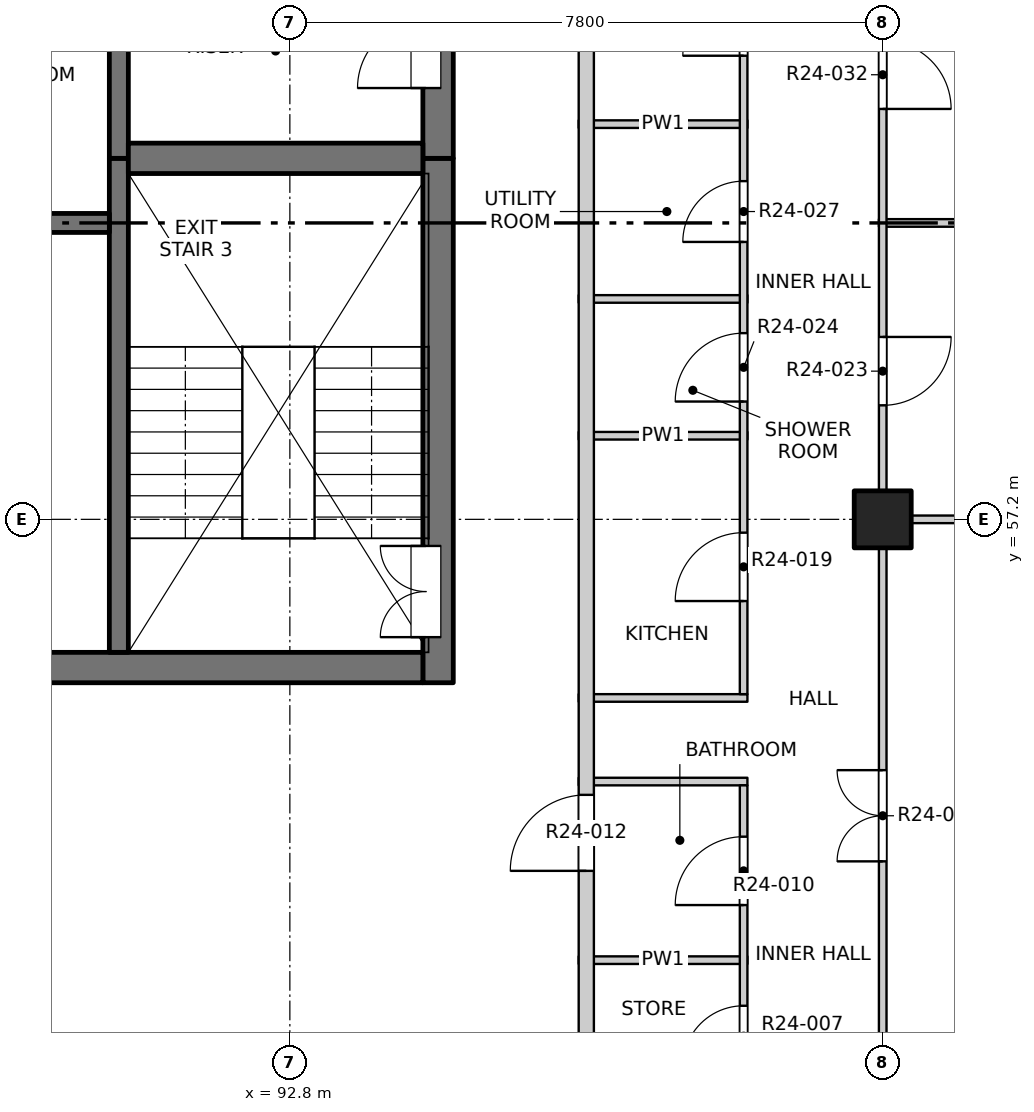
"""IFC4 building model, lengths in metres.
Left out: names, types, materials, properties, quantities, classifications, styles, units other than length and angle.
Written with IfcOpenShell. Run it as: python <this file> out.ifc"""

import sys

from ifc_helpers import new_model, si_unit, direction, frame, frame_2d, origin, origin_2d, place, context, subcontext, project, spatial, rectangle, extrude, element, fill, save


model = new_model("IFC4")
c1 = context("Model", 3, precision=1e-05, world=origin(), true_north=direction((0.0, 1.0)))
c2 = subcontext(c1, "Body", "Model", "MODEL_VIEW")
j1 = project(units=[si_unit("LENGTHUNIT", "METRE"), si_unit("PLANEANGLEUNIT", "RADIAN")], contexts=[c1])
p1 = place(None, origin())
s1 = spatial("IfcSite", under=j1, at=p1, CompositionType="ELEMENT")
p2 = place(p1, origin())
s2 = spatial("IfcBuilding", under=s1, at=p2, CompositionType="ELEMENT")
p3 = place(p2, frame((0.0, 0.0, 246.0)))
s3 = spatial("IfcBuildingStorey", under=s2, at=p3, CompositionType="ELEMENT", Elevation=246.0)
p4 = place(p3, frame((100.6, 57.2, -0.3), z_axis=(0.0, 0.0, 1.0), x_axis=(1.0, 0.0, 0.0)))
e1 = element("IfcColumn", 1, at=p4, inside=s3, PredefinedType="COLUMN", context=c2, shape_type="SweptSolid", body=[
    extrude(rectangle(XDim=0.75, YDim=0.75, at=origin_2d()), origin(), (0.0, 0.0, 1.0), 3.45),
])
p5 = place(p3, frame((94.75, 55.05, -0.3), z_axis=(0.0, 0.0, 1.0), x_axis=(0.0, 1.0, 0.0)))
e2 = element("IfcWall", 2, at=p5, inside=s3, PredefinedType="SOLIDWALL", context=c2, shape_type="SweptSolid", body=[
    extrude(rectangle(XDim=6.9, YDim=0.4, at=frame_2d((3.45, 0.0))), origin(), (0.0, 0.0, 1.0), 3.45),
])
p6 = place(p5, frame((0.6, 0.0, 0.3)))
e3 = element("IfcOpeningElement", 3, at=p6, cuts=e2, PredefinedType="OPENING", context=c2, shape_type="SweptSolid", body=[
    extrude(rectangle(XDim=1.2, YDim=2.1, at=frame_2d((0.6, 1.05))), frame((0.0, 0.21, 0.0), z_axis=(0.0, -1.0, 0.0), x_axis=(1.0, 0.0, 0.0)), (0.0, 0.0, 1.0), 0.42),
])
p7 = place(p3, frame((94.75, 61.95, -0.3), z_axis=(0.0, 0.0, 1.0), x_axis=(0.0, 1.0, 0.0)))
e4 = element("IfcWall", 4, at=p7, inside=s3, PredefinedType="SOLIDWALL", context=c2, shape_type="SweptSolid", body=[
    extrude(rectangle(XDim=15.35, YDim=0.4, at=frame_2d((7.675, 0.0))), origin(), (0.0, 0.0, 1.0), 3.45),
])
p8 = place(p7, frame((0.925, 0.0, 0.3)))
e5 = element("IfcOpeningElement", 5, at=p8, cuts=e4, PredefinedType="OPENING", context=c2, shape_type="SweptSolid", body=[
    extrude(rectangle(XDim=0.9, YDim=2.1, at=frame_2d((0.45, 1.05))), frame((0.0, 0.21, 0.0), z_axis=(0.0, -1.0, 0.0), x_axis=(1.0, 0.0, 0.0)), (0.0, 0.0, 1.0), 0.42),
])
p9 = place(p7, frame((3.8, 0.0, 0.3)))
e6 = element("IfcOpeningElement", 6, at=p9, cuts=e4, PredefinedType="OPENING", context=c2, shape_type="SweptSolid", body=[
    extrude(rectangle(XDim=0.9, YDim=2.1, at=frame_2d((0.45, 1.05))), frame((0.0, 0.21, 0.0), z_axis=(0.0, -1.0, 0.0), x_axis=(1.0, 0.0, 0.0)), (0.0, 0.0, 1.0), 0.42),
])
p10 = place(p7, frame((6.8, 0.0, 0.3)))
e7 = element("IfcOpeningElement", 7, at=p10, cuts=e4, PredefinedType="OPENING", context=c2, shape_type="SweptSolid", body=[
    extrude(rectangle(XDim=0.9, YDim=2.1, at=frame_2d((0.45, 1.05))), frame((0.0, 0.21, 0.0), z_axis=(0.0, -1.0, 0.0), x_axis=(1.0, 0.0, 0.0)), (0.0, 0.0, 1.0), 0.42),
])
p11 = place(p7, frame((9.8, 0.0, 0.3)))
e8 = element("IfcOpeningElement", 8, at=p11, cuts=e4, PredefinedType="OPENING", context=c2, shape_type="SweptSolid", body=[
    extrude(rectangle(XDim=0.9, YDim=2.1, at=frame_2d((0.45, 1.05))), frame((0.0, 0.21, 0.0), z_axis=(0.0, -1.0, 0.0), x_axis=(1.0, 0.0, 0.0)), (0.0, 0.0, 1.0), 0.42),
])
p12 = place(p7, frame((13.1, 0.0, 0.3)))
e9 = element("IfcOpeningElement", 9, at=p12, cuts=e4, PredefinedType="OPENING", context=c2, shape_type="SweptSolid", body=[
    extrude(rectangle(XDim=0.9, YDim=2.1, at=frame_2d((0.45, 1.05))), frame((0.0, 0.21, 0.0), z_axis=(0.0, -1.0, 0.0), x_axis=(1.0, 0.0, 0.0)), (0.0, 0.0, 1.0), 0.42),
])
p13 = place(p3, frame((75.45, 55.25, -0.3), z_axis=(0.0, 0.0, 1.0), x_axis=(1.0, 0.0, 0.0)))
e10 = element("IfcWall", 10, at=p13, inside=s3, PredefinedType="SOLIDWALL", context=c2, shape_type="SweptSolid", body=[
    extrude(rectangle(XDim=19.1, YDim=0.4, at=frame_2d((9.55, 0.0))), origin(), (0.0, 0.0, 1.0), 3.45),
])
p14 = place(p13, frame((8.8, 0.0, 0.3)))
e11 = element("IfcOpeningElement", 11, at=p14, cuts=e10, PredefinedType="OPENING", context=c2, shape_type="SweptSolid", body=[
    extrude(rectangle(XDim=1.5, YDim=2.1, at=frame_2d((0.75, 1.05))), frame((0.0, 0.21, 0.0), z_axis=(0.0, -1.0, 0.0), x_axis=(1.0, 0.0, 0.0)), (0.0, 0.0, 1.0), 0.42),
])
p15 = place(p3, frame((90.55, 55.45, -0.3), z_axis=(0.0, 0.0, 1.0), x_axis=(0.0, 1.0, 0.0)))
e12 = element("IfcWall", 12, at=p15, inside=s3, PredefinedType="SOLIDWALL", context=c2, shape_type="SweptSolid", body=[
    extrude(rectangle(XDim=6.5, YDim=0.25, at=frame_2d((3.25, 0.0))), origin(), (0.0, 0.0, 1.0), 3.45),
])
p16 = place(p3, frame((90.55, 61.95, -0.3), z_axis=(0.0, 0.0, 1.0), x_axis=(0.0, 1.0, 0.0)))
e13 = element("IfcWall", 13, at=p16, inside=s3, PredefinedType="SOLIDWALL", context=c2, shape_type="SweptSolid", body=[
    extrude(rectangle(XDim=15.35, YDim=0.25, at=frame_2d((7.675, 0.0))), origin(), (0.0, 0.0, 1.0), 3.45),
])
p17 = place(p3, frame((87.425, 61.1, -0.3), z_axis=(0.0, 0.0, 1.0), x_axis=(1.0, 0.0, 0.0)))
e14 = element("IfcWall", 14, at=p17, inside=s3, PredefinedType="SOLIDWALL", context=c2, shape_type="SweptSolid", body=[
    extrude(rectangle(XDim=3.0, YDim=0.25, at=frame_2d((1.5, 0.0))), origin(), (0.0, 0.0, 1.0), 3.45),
])
p18 = place(p3, frame((90.675, 61.95, -0.3), z_axis=(0.0, 0.0, 1.0), x_axis=(1.0, 0.0, 0.0)))
e15 = element("IfcWall", 15, at=p18, inside=s3, PredefinedType="SOLIDWALL", context=c2, shape_type="SweptSolid", body=[
    extrude(rectangle(XDim=3.875, YDim=0.4, at=frame_2d((1.938, 0.0))), origin(), (0.0, 0.0, 1.0), 3.45),
])
for number, where, z_axis, x_axis in (
    (16, (96.6, 51.4, 0.0), (0.0, 0.0, 1.0), (1.0, 0.0, 0.0)),
    (17, (96.6, 53.75, 0.0), (0.0, 0.0, 1.0), (1.0, 0.0, 0.0)),
    (18, (96.6, 54.85, 0.0), (0.0, 0.0, 1.0), (1.0, 0.0, 0.0)),
):
    element("IfcWall", number, at=place(p3, frame(where, z_axis=z_axis, x_axis=x_axis)), inside=s3, PredefinedType="PARTITIONING", context=c2, shape_type="SweptSolid", body=[
        extrude(rectangle(XDim=2.22, YDim=0.1, at=frame_2d((1.11, 0.0))), origin(), (0.0, 0.0, 1.0), 3.15),
    ])
p19 = place(p3, frame((100.55, 57.2, 0.0), z_axis=(0.0, 0.0, 1.0), x_axis=(1.0, 0.0, 0.0)))
e19 = element("IfcWall", 19, at=p19, inside=s3, PredefinedType="PARTITIONING", context=c2, shape_type="SweptSolid", body=[
    extrude(rectangle(XDim=3.65, YDim=0.1, at=frame_2d((1.825, 0.0))), origin(), (0.0, 0.0, 1.0), 3.15),
])
for number, where, z_axis, x_axis in (
    (20, (96.6, 58.3, 0.0), (0.0, 0.0, 1.0), (1.0, 0.0, 0.0)),
    (21, (96.6, 60.1, 0.0), (0.0, 0.0, 1.0), (1.0, 0.0, 0.0)),
):
    element("IfcWall", number, at=place(p3, frame(where, z_axis=z_axis, x_axis=x_axis)), inside=s3, PredefinedType="PARTITIONING", context=c2, shape_type="SweptSolid", body=[
        extrude(rectangle(XDim=2.22, YDim=0.1, at=frame_2d((1.11, 0.0))), origin(), (0.0, 0.0, 1.0), 3.15),
    ])
p20 = place(p3, frame((100.55, 61.1, 0.0), z_axis=(0.0, 0.0, 1.0), x_axis=(1.0, 0.0, 0.0)))
e22 = element("IfcWall", 22, at=p20, inside=s3, PredefinedType="PARTITIONING", context=c2, shape_type="SweptSolid", body=[
    extrude(rectangle(XDim=3.65, YDim=0.1, at=frame_2d((1.825, 0.0))), origin(), (0.0, 0.0, 1.0), 2.55),
])
p21 = place(p3, frame((96.6, 62.4, 0.0), z_axis=(0.0, 0.0, 1.0), x_axis=(1.0, 0.0, 0.0)))
e23 = element("IfcWall", 23, at=p21, inside=s3, PredefinedType="PARTITIONING", context=c2, shape_type="SweptSolid", body=[
    extrude(rectangle(XDim=2.22, YDim=0.1, at=frame_2d((1.11, 0.0))), origin(), (0.0, 0.0, 1.0), 3.15),
])
p22 = place(p3, frame((96.7, 49.5, 0.0), z_axis=(0.0, 0.0, 1.0), x_axis=(0.0, 1.0, 0.0)))
e24 = element("IfcWall", 24, at=p22, inside=s3, PredefinedType="PARTITIONING", context=c2, shape_type="SweptSolid", body=[
    extrude(rectangle(XDim=34.7, YDim=0.2, at=frame_2d((17.35, 0.0))), origin(), (0.0, 0.0, 1.0), 3.15),
])
p23 = place(p22, frame((3.075, 0.0, 0.0)))
e25 = element("IfcOpeningElement", 25, at=p23, cuts=e24, PredefinedType="OPENING", context=c2, shape_type="SweptSolid", body=[
    extrude(rectangle(XDim=1.0, YDim=2.1, at=frame_2d((0.5, 1.05))), frame((0.0, 0.11, 0.0), z_axis=(0.0, -1.0, 0.0), x_axis=(1.0, 0.0, 0.0)), (0.0, 0.0, 1.0), 0.22),
])
p24 = place(p22, frame((18.425, 0.0, 0.0)))
e26 = element("IfcOpeningElement", 26, at=p24, cuts=e24, PredefinedType="OPENING", context=c2, shape_type="SweptSolid", body=[
    extrude(rectangle(XDim=1.0, YDim=2.1, at=frame_2d((0.5, 1.05))), frame((0.0, 0.11, 0.0), z_axis=(0.0, -1.0, 0.0), x_axis=(1.0, 0.0, 0.0)), (0.0, 0.0, 1.0), 0.22),
])
p25 = place(p22, frame((25.825, 0.0, 0.0)))
e27 = element("IfcOpeningElement", 27, at=p25, cuts=e24, PredefinedType="OPENING", context=c2, shape_type="SweptSolid", body=[
    extrude(rectangle(XDim=1.0, YDim=2.1, at=frame_2d((0.5, 1.05))), frame((0.0, 0.11, 0.0), z_axis=(0.0, -1.0, 0.0), x_axis=(1.0, 0.0, 0.0)), (0.0, 0.0, 1.0), 0.22),
])
p26 = place(p3, frame((98.77, 49.45, 0.0), z_axis=(0.0, 0.0, 1.0), x_axis=(0.0, 1.0, 0.0)))
e28 = element("IfcWall", 28, at=p26, inside=s3, PredefinedType="PARTITIONING", context=c2, shape_type="SweptSolid", body=[
    extrude(rectangle(XDim=4.25, YDim=0.1, at=frame_2d((2.125, 0.0))), origin(), (0.0, 0.0, 1.0), 3.15),
])
p27 = place(p26, frame((0.55, 0.0, 0.0)))
e29 = element("IfcOpeningElement", 29, at=p27, cuts=e28, PredefinedType="OPENING", context=c2, shape_type="SweptSolid", body=[
    extrude(rectangle(XDim=0.8, YDim=2.1, at=frame_2d((0.4, 1.05))), frame((0.0, 0.06, 0.0), z_axis=(0.0, -1.0, 0.0), x_axis=(1.0, 0.0, 0.0)), (0.0, 0.0, 1.0), 0.12),
])
p28 = place(p26, frame((2.675, 0.0, 0.0)))
e30 = element("IfcOpeningElement", 30, at=p28, cuts=e28, PredefinedType="OPENING", context=c2, shape_type="SweptSolid", body=[
    extrude(rectangle(XDim=0.9, YDim=2.1, at=frame_2d((0.45, 1.05))), frame((0.0, 0.06, 0.0), z_axis=(0.0, -1.0, 0.0), x_axis=(1.0, 0.0, 0.0)), (0.0, 0.0, 1.0), 0.12),
])
p29 = place(p3, frame((98.77, 54.9, 0.0), z_axis=(0.0, 0.0, 1.0), x_axis=(0.0, 1.0, 0.0)))
e31 = element("IfcWall", 31, at=p29, inside=s3, PredefinedType="PARTITIONING", context=c2, shape_type="SweptSolid", body=[
    extrude(rectangle(XDim=11.7, YDim=0.1, at=frame_2d((5.85, 0.0))), origin(), (0.0, 0.0, 1.0), 3.15),
])
p30 = place(p29, frame((1.225, 0.0, 0.0)))
e32 = element("IfcOpeningElement", 32, at=p30, cuts=e31, PredefinedType="OPENING", context=c2, shape_type="SweptSolid", body=[
    extrude(rectangle(XDim=0.9, YDim=2.1, at=frame_2d((0.45, 1.05))), frame((0.0, 0.06, 0.0), z_axis=(0.0, -1.0, 0.0), x_axis=(1.0, 0.0, 0.0)), (0.0, 0.0, 1.0), 0.12),
])
p31 = place(p29, frame((3.85, 0.0, 0.0)))
e33 = element("IfcOpeningElement", 33, at=p31, cuts=e31, PredefinedType="OPENING", context=c2, shape_type="SweptSolid", body=[
    extrude(rectangle(XDim=0.9, YDim=2.1, at=frame_2d((0.45, 1.05))), frame((0.0, 0.06, 0.0), z_axis=(0.0, -1.0, 0.0), x_axis=(1.0, 0.0, 0.0)), (0.0, 0.0, 1.0), 0.12),
])
p32 = place(p29, frame((5.95, 0.0, 0.0)))
e34 = element("IfcOpeningElement", 34, at=p32, cuts=e31, PredefinedType="OPENING", context=c2, shape_type="SweptSolid", body=[
    extrude(rectangle(XDim=0.8, YDim=2.1, at=frame_2d((0.4, 1.05))), frame((0.0, 0.06, 0.0), z_axis=(0.0, -1.0, 0.0), x_axis=(1.0, 0.0, 0.0)), (0.0, 0.0, 1.0), 0.12),
])
p33 = place(p29, frame((8.4, 0.0, 0.0)))
e35 = element("IfcOpeningElement", 35, at=p33, cuts=e31, PredefinedType="OPENING", context=c2, shape_type="SweptSolid", body=[
    extrude(rectangle(XDim=0.8, YDim=2.1, at=frame_2d((0.4, 1.05))), frame((0.0, 0.06, 0.0), z_axis=(0.0, -1.0, 0.0), x_axis=(1.0, 0.0, 0.0)), (0.0, 0.0, 1.0), 0.12),
])
p34 = place(p29, frame((10.475, 0.0, 0.0)))
e36 = element("IfcOpeningElement", 36, at=p34, cuts=e31, PredefinedType="OPENING", context=c2, shape_type="SweptSolid", body=[
    extrude(rectangle(XDim=0.9, YDim=2.1, at=frame_2d((0.45, 1.05))), frame((0.0, 0.06, 0.0), z_axis=(0.0, -1.0, 0.0), x_axis=(1.0, 0.0, 0.0)), (0.0, 0.0, 1.0), 0.12),
])
p35 = place(p3, frame((100.6, 45.8, 0.0), z_axis=(0.0, 0.0, 1.0), x_axis=(0.0, 1.0, 0.0)))
e37 = element("IfcWall", 37, at=p35, inside=s3, PredefinedType="PARTITIONING", context=c2, shape_type="SweptSolid", body=[
    extrude(rectangle(XDim=38.4, YDim=0.1, at=frame_2d((19.2, 0.0))), origin(), (0.0, 0.0, 1.0), 3.15),
])
p36 = place(p35, frame((1.05, 0.0, 0.0)))
e38 = element("IfcOpeningElement", 38, at=p36, cuts=e37, PredefinedType="OPENING", context=c2, shape_type="SweptSolid", body=[
    extrude(rectangle(XDim=1.2, YDim=2.1, at=frame_2d((0.6, 1.05))), frame((0.0, 0.06, 0.0), z_axis=(0.0, -1.0, 0.0), x_axis=(1.0, 0.0, 0.0)), (0.0, 0.0, 1.0), 0.12),
])
p37 = place(p35, frame((6.9, 0.0, 0.0)))
e39 = element("IfcOpeningElement", 39, at=p37, cuts=e37, PredefinedType="OPENING", context=c2, shape_type="SweptSolid", body=[
    extrude(rectangle(XDim=1.2, YDim=2.1, at=frame_2d((0.6, 1.05))), frame((0.0, 0.06, 0.0), z_axis=(0.0, -1.0, 0.0), x_axis=(1.0, 0.0, 0.0)), (0.0, 0.0, 1.0), 0.12),
])
p38 = place(p35, frame((12.9, 0.0, 0.0)))
e40 = element("IfcOpeningElement", 40, at=p38, cuts=e37, PredefinedType="OPENING", context=c2, shape_type="SweptSolid", body=[
    extrude(rectangle(XDim=0.9, YDim=2.1, at=frame_2d((0.45, 1.05))), frame((0.0, 0.06, 0.0), z_axis=(0.0, -1.0, 0.0), x_axis=(1.0, 0.0, 0.0)), (0.0, 0.0, 1.0), 0.12),
])
p39 = place(p35, frame((16.8, 0.0, 0.0)))
e41 = element("IfcOpeningElement", 41, at=p39, cuts=e37, PredefinedType="OPENING", context=c2, shape_type="SweptSolid", body=[
    extrude(rectangle(XDim=0.9, YDim=2.1, at=frame_2d((0.45, 1.05))), frame((0.0, 0.06, 0.0), z_axis=(0.0, -1.0, 0.0), x_axis=(1.0, 0.0, 0.0)), (0.0, 0.0, 1.0), 0.12),
])
p40 = place(p35, frame((20.7, 0.0, 0.0)))
e42 = element("IfcOpeningElement", 42, at=p40, cuts=e37, PredefinedType="OPENING", context=c2, shape_type="SweptSolid", body=[
    extrude(rectangle(XDim=0.9, YDim=2.1, at=frame_2d((0.45, 1.05))), frame((0.0, 0.06, 0.0), z_axis=(0.0, -1.0, 0.0), x_axis=(1.0, 0.0, 0.0)), (0.0, 0.0, 1.0), 0.12),
])
p41 = place(p35, frame((24.6, 0.0, 0.0)))
e43 = element("IfcOpeningElement", 43, at=p41, cuts=e37, PredefinedType="OPENING", context=c2, shape_type="SweptSolid", body=[
    extrude(rectangle(XDim=0.9, YDim=2.1, at=frame_2d((0.45, 1.05))), frame((0.0, 0.06, 0.0), z_axis=(0.0, -1.0, 0.0), x_axis=(1.0, 0.0, 0.0)), (0.0, 0.0, 1.0), 0.12),
])
p42 = place(p35, frame((30.3, 0.0, 0.0)))
e44 = element("IfcOpeningElement", 44, at=p42, cuts=e37, PredefinedType="OPENING", context=c2, shape_type="SweptSolid", body=[
    extrude(rectangle(XDim=1.2, YDim=2.1, at=frame_2d((0.6, 1.05))), frame((0.0, 0.06, 0.0), z_axis=(0.0, -1.0, 0.0), x_axis=(1.0, 0.0, 0.0)), (0.0, 0.0, 1.0), 0.12),
])
p43 = place(p35, frame((36.15, 0.0, 0.0)))
e45 = element("IfcOpeningElement", 45, at=p43, cuts=e37, PredefinedType="OPENING", context=c2, shape_type="SweptSolid", body=[
    extrude(rectangle(XDim=1.2, YDim=2.1, at=frame_2d((0.6, 1.05))), frame((0.0, 0.06, 0.0), z_axis=(0.0, -1.0, 0.0), x_axis=(1.0, 0.0, 0.0)), (0.0, 0.0, 1.0), 0.12),
])
p44 = place(p27, origin())
e46 = element("IfcDoor", 46, at=p44, inside=s3, OperationType="SINGLE_SWING_LEFT", PredefinedType="DOOR", context=c2, shape_type="SweptSolid", body=[
    extrude(rectangle(XDim=0.8, YDim=2.1, at=frame_2d((0.4, 1.05))), frame((0.0, 0.025, 0.0), z_axis=(0.0, -1.0, 0.0), x_axis=(1.0, 0.0, 0.0)), (0.0, 0.0, 1.0), 0.05),
])
fill(e29, e46)
p45 = place(p28, origin())
e47 = element("IfcDoor", 47, at=p45, inside=s3, OperationType="SINGLE_SWING_LEFT", PredefinedType="DOOR", context=c2, shape_type="SweptSolid", body=[
    extrude(rectangle(XDim=0.9, YDim=2.1, at=frame_2d((0.45, 1.05))), frame((0.0, 0.025, 0.0), z_axis=(0.0, -1.0, 0.0), x_axis=(1.0, 0.0, 0.0)), (0.0, 0.0, 1.0), 0.05),
])
fill(e30, e47)
p46 = place(p23, origin())
e48 = element("IfcDoor", 48, at=p46, inside=s3, OperationType="SINGLE_SWING_RIGHT", PredefinedType="DOOR", context=c2, shape_type="SweptSolid", body=[
    extrude(rectangle(XDim=1.0, YDim=2.1, at=frame_2d((0.5, 1.05))), frame((0.0, 0.025, 0.0), z_axis=(0.0, -1.0, 0.0), x_axis=(1.0, 0.0, 0.0)), (0.0, 0.0, 1.0), 0.05),
])
fill(e25, e48)
p47 = place(p37, origin())
e49 = element("IfcDoor", 49, at=p47, inside=s3, OperationType="DOUBLE_DOOR_SINGLE_SWING", PredefinedType="DOOR", context=c2, shape_type="SweptSolid", body=[
    extrude(rectangle(XDim=1.2, YDim=2.1, at=frame_2d((0.6, 1.05))), frame((0.0, 0.025, 0.0), z_axis=(0.0, -1.0, 0.0), x_axis=(1.0, 0.0, 0.0)), (0.0, 0.0, 1.0), 0.05),
])
fill(e39, e49)
p48 = place(p6, origin())
e50 = element("IfcDoor", 50, at=p48, inside=s3, OperationType="DOUBLE_DOOR_SINGLE_SWING", PredefinedType="DOOR", context=c2, shape_type="SweptSolid", body=[
    extrude(rectangle(XDim=1.2, YDim=2.1, at=frame_2d((0.6, 1.05))), frame((0.0, 0.185, 0.0), z_axis=(0.0, -1.0, 0.0), x_axis=(1.0, 0.0, 0.0)), (0.0, 0.0, 1.0), 0.05),
])
fill(e3, e50)
p49 = place(p30, origin())
e51 = element("IfcDoor", 51, at=p49, inside=s3, OperationType="SINGLE_SWING_LEFT", PredefinedType="DOOR", context=c2, shape_type="SweptSolid", body=[
    extrude(rectangle(XDim=0.9, YDim=2.1, at=frame_2d((0.45, 1.05))), frame((0.0, 0.025, 0.0), z_axis=(0.0, -1.0, 0.0), x_axis=(1.0, 0.0, 0.0)), (0.0, 0.0, 1.0), 0.05),
])
fill(e32, e51)
p50 = place(p38, origin())
e52 = element("IfcDoor", 52, at=p50, inside=s3, OperationType="SINGLE_SWING_LEFT", PredefinedType="DOOR", context=c2, shape_type="SweptSolid", body=[
    extrude(rectangle(XDim=0.9, YDim=2.1, at=frame_2d((0.45, 1.05))), frame((0.0, 0.025, 0.0), z_axis=(0.0, -1.0, 0.0), x_axis=(1.0, 0.0, 0.0)), (0.0, 0.0, 1.0), 0.05),
])
fill(e40, e52)
p51 = place(p31, origin())
e53 = element("IfcDoor", 53, at=p51, inside=s3, OperationType="SINGLE_SWING_LEFT", PredefinedType="DOOR", context=c2, shape_type="SweptSolid", body=[
    extrude(rectangle(XDim=0.9, YDim=2.1, at=frame_2d((0.45, 1.05))), frame((0.0, 0.025, 0.0), z_axis=(0.0, -1.0, 0.0), x_axis=(1.0, 0.0, 0.0)), (0.0, 0.0, 1.0), 0.05),
])
fill(e33, e53)
p52 = place(p32, origin())
e54 = element("IfcDoor", 54, at=p52, inside=s3, OperationType="SINGLE_SWING_LEFT", PredefinedType="DOOR", context=c2, shape_type="SweptSolid", body=[
    extrude(rectangle(XDim=0.8, YDim=2.1, at=frame_2d((0.4, 1.05))), frame((0.0, 0.025, 0.0), z_axis=(0.0, -1.0, 0.0), x_axis=(1.0, 0.0, 0.0)), (0.0, 0.0, 1.0), 0.05),
])
fill(e34, e54)
p53 = place(p39, origin())
e55 = element("IfcDoor", 55, at=p53, inside=s3, OperationType="SINGLE_SWING_RIGHT", PredefinedType="DOOR", context=c2, shape_type="SweptSolid", body=[
    extrude(rectangle(XDim=0.9, YDim=2.1, at=frame_2d((0.45, 1.05))), frame((0.0, 0.025, 0.0), z_axis=(0.0, -1.0, 0.0), x_axis=(1.0, 0.0, 0.0)), (0.0, 0.0, 1.0), 0.05),
])
fill(e41, e55)
p54 = place(p8, origin())
e56 = element("IfcDoor", 56, at=p54, inside=s3, OperationType="SINGLE_SWING_LEFT", PredefinedType="DOOR", context=c2, shape_type="SweptSolid", body=[
    extrude(rectangle(XDim=0.9, YDim=2.1, at=frame_2d((0.45, 1.05))), frame((0.0, 0.185, 0.0), z_axis=(0.0, -1.0, 0.0), x_axis=(1.0, 0.0, 0.0)), (0.0, 0.0, 1.0), 0.05),
])
fill(e5, e56)
p55 = place(p33, origin())
e57 = element("IfcDoor", 57, at=p55, inside=s3, OperationType="SINGLE_SWING_LEFT", PredefinedType="DOOR", context=c2, shape_type="SweptSolid", body=[
    extrude(rectangle(XDim=0.8, YDim=2.1, at=frame_2d((0.4, 1.05))), frame((0.0, 0.025, 0.0), z_axis=(0.0, -1.0, 0.0), x_axis=(1.0, 0.0, 0.0)), (0.0, 0.0, 1.0), 0.05),
])
fill(e35, e57)
save(model, sys.argv[1])
